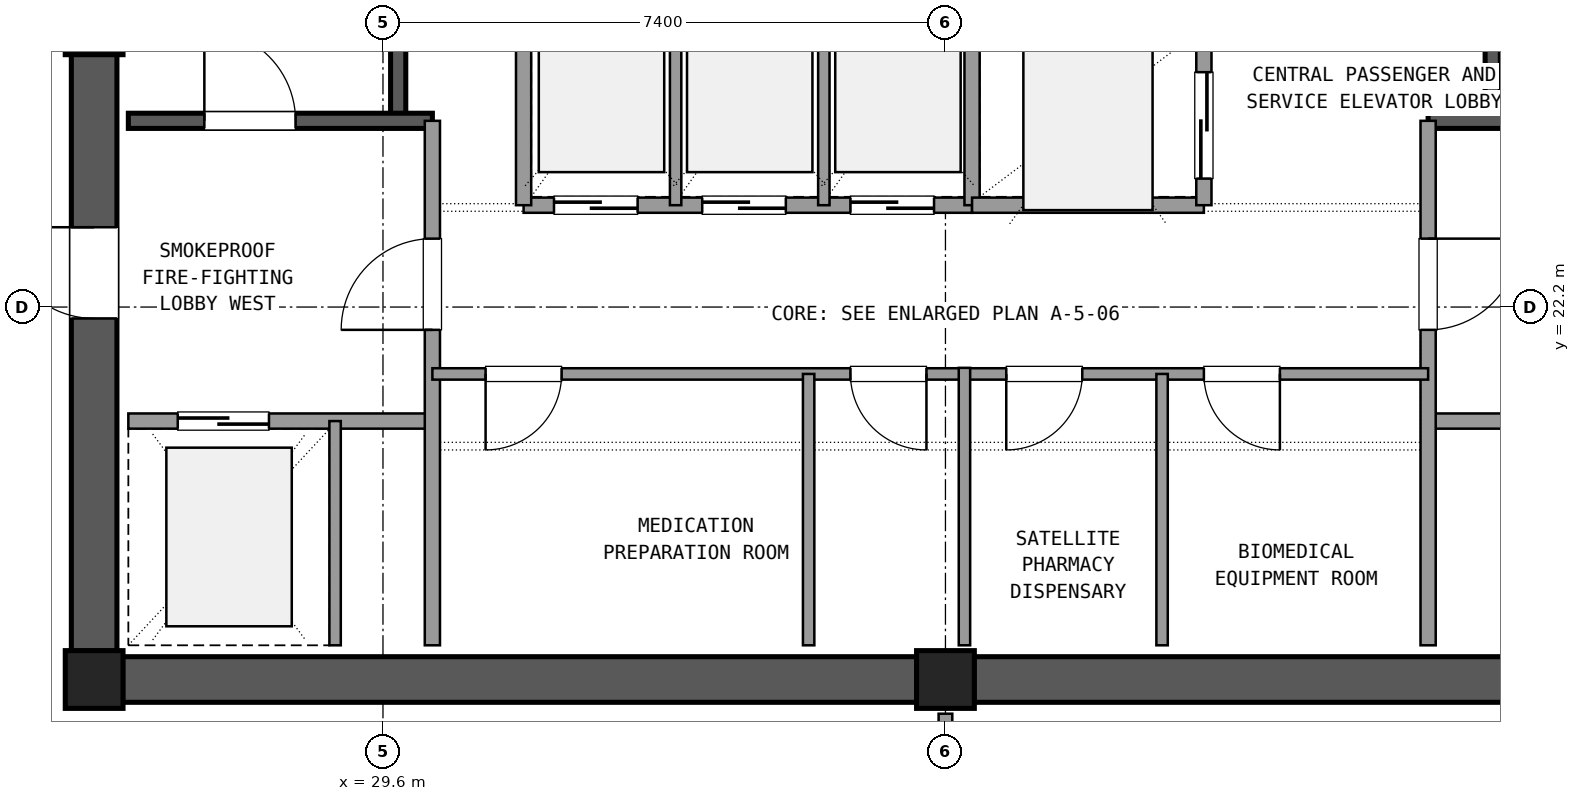
"""IFC4 building model, lengths in metres.
Left out: names, types, materials, properties, quantities, classifications, styles, units other than length and angle.
Written with IfcOpenShell. Run it as: python <this file> out.ifc"""

import sys

from ifc_helpers import new_model, si_unit, direction, frame, frame_2d, origin, origin_2d, place, context, subcontext, project, spatial, rectangle, extrude, element, fill, save


model = new_model("IFC4")
c1 = context("Model", 3, precision=1e-05, world=origin(), true_north=direction((0.0, 1.0)))
c2 = subcontext(c1, "Body", "Model", "MODEL_VIEW")
j1 = project(units=[si_unit("LENGTHUNIT", "METRE"), si_unit("PLANEANGLEUNIT", "RADIAN")], contexts=[c1])
p1 = place(None, origin())
s1 = spatial("IfcSite", under=j1, at=p1, CompositionType="ELEMENT")
p2 = place(p1, origin())
s2 = spatial("IfcBuilding", under=s1, at=p2, CompositionType="ELEMENT")
p3 = place(p2, frame((0.0, 0.0, 260.82)))
s3 = spatial("IfcBuildingStorey", under=s2, at=p3, CompositionType="ELEMENT", Elevation=260.82)
for number, where, z_axis, x_axis in (
    (1, (25.8, 17.3, 0.0), (0.0, 0.0, 1.0), (1.0, 0.0, 0.0)),
    (2, (37.0, 17.3, 0.0), (0.0, 0.0, 1.0), (1.0, 0.0, 0.0)),
    (3, (25.8, 25.9, 0.0), (0.0, 0.0, 1.0), (1.0, 0.0, 0.0)),
):
    element("IfcColumn", number, at=place(p3, frame(where, z_axis=z_axis, x_axis=x_axis)), inside=s3, PredefinedType="COLUMN", context=c2, shape_type="SweptSolid", body=[
        extrude(rectangle(XDim=0.76, YDim=0.76, at=origin_2d()), origin(), (0.0, 0.0, 1.0), 3.6),
    ])
for number, where, z_axis, x_axis in (
    (4, (26.175, 17.3, 0.0), (0.0, 0.0, 1.0), (1.0, 0.0, 0.0)),
    (5, (37.375, 17.3, 0.0), (0.0, 0.0, 1.0), (1.0, 0.0, 0.0)),
):
    element("IfcWall", number, at=place(p3, frame(where, z_axis=z_axis, x_axis=x_axis)), inside=s3, PredefinedType="SHEAR", context=c2, shape_type="SweptSolid", body=[
        extrude(rectangle(XDim=10.45, YDim=0.6, at=frame_2d((5.225, 0.0))), origin(), (0.0, 0.0, 1.0), 3.32),
    ])
p4 = place(p3, frame((25.8, 25.525, 0.0), z_axis=(0.0, 0.0, 1.0), x_axis=(0.0, -1.0, 0.0)))
e6 = element("IfcWall", 6, at=p4, inside=s3, PredefinedType="SHEAR", context=c2, shape_type="SweptSolid", body=[
    extrude(rectangle(XDim=7.85, YDim=0.6, at=frame_2d((3.925, 0.0))), origin(), (0.0, 0.0, 1.0), 3.32),
])
p5 = place(p4, frame((2.275, 0.0, 0.0)))
e7 = element("IfcOpeningElement", 7, at=p5, cuts=e6, PredefinedType="OPENING", context=c2, shape_type="SweptSolid", body=[
    extrude(rectangle(XDim=1.2, YDim=2.15, at=frame_2d((0.6, 1.075))), frame((0.0, 0.31, 0.0), z_axis=(0.0, -1.0, 0.0), x_axis=(1.0, 0.0, 0.0)), (0.0, 0.0, 1.0), 0.62),
])
p6 = place(p3, frame((29.8, 24.65, 0.0), z_axis=(0.0, 0.0, 1.0), x_axis=(0.0, 1.0, 0.0)))
e8 = element("IfcWall", 8, at=p6, inside=s3, PredefinedType="SHEAR", context=c2, shape_type="SweptSolid", body=[
    extrude(rectangle(XDim=9.4, YDim=0.2, at=frame_2d((4.7, 0.0))), origin(), (0.0, 0.0, 1.0), 3.32),
])
p7 = place(p3, frame((26.25, 24.65, 0.0), z_axis=(0.0, 0.0, 1.0), x_axis=(1.0, 0.0, 0.0)))
e9 = element("IfcWall", 9, at=p7, inside=s3, PredefinedType="SHEAR", context=c2, shape_type="SweptSolid", body=[
    extrude(rectangle(XDim=4.0, YDim=0.2, at=frame_2d((2.0, 0.0))), origin(), (0.0, 0.0, 1.0), 3.32),
])
p8 = place(p7, frame((1.0, 0.0, 0.0)))
e10 = element("IfcOpeningElement", 10, at=p8, cuts=e9, PredefinedType="OPENING", context=c2, shape_type="SweptSolid", body=[
    extrude(rectangle(XDim=1.2, YDim=2.15, at=frame_2d((0.6, 1.075))), frame((0.0, 0.11, 0.0), z_axis=(0.0, -1.0, 0.0), x_axis=(1.0, 0.0, 0.0)), (0.0, 0.0, 1.0), 0.22),
])
p9 = place(p3, frame((44.2, 24.65, 0.0), z_axis=(0.0, 0.0, 1.0), x_axis=(0.0, 1.0, 0.0)))
e11 = element("IfcWall", 11, at=p9, inside=s3, PredefinedType="SHEAR", context=c2, shape_type="SweptSolid", body=[
    extrude(rectangle(XDim=9.4, YDim=0.2, at=frame_2d((4.7, 0.0))), origin(), (0.0, 0.0, 1.0), 3.32),
])
p10 = place(p3, frame((43.35, 24.65, 0.0), z_axis=(0.0, 0.0, 1.0), x_axis=(1.0, 0.0, 0.0)))
e12 = element("IfcWall", 12, at=p10, inside=s3, PredefinedType="SHEAR", context=c2, shape_type="SweptSolid", body=[
    extrude(rectangle(XDim=4.4, YDim=0.2, at=frame_2d((2.2, 0.0))), origin(), (0.0, 0.0, 1.0), 3.32),
])
p11 = place(p10, frame((2.0, 0.0, 0.0)))
e13 = element("IfcOpeningElement", 13, at=p11, cuts=e12, PredefinedType="OPENING", context=c2, shape_type="SweptSolid", body=[
    extrude(rectangle(XDim=1.2, YDim=2.15, at=frame_2d((0.6, 1.075))), frame((0.0, 0.11, 0.0), z_axis=(0.0, -1.0, 0.0), x_axis=(1.0, 0.0, 0.0)), (0.0, 0.0, 1.0), 0.22),
])
p12 = place(p3, frame((26.25, 20.7, 0.0), z_axis=(0.0, 0.0, 1.0), x_axis=(1.0, 0.0, 0.0)))
e14 = element("IfcWall", 14, at=p12, inside=s3, PredefinedType="SOLIDWALL", context=c2, shape_type="SweptSolid", body=[
    extrude(rectangle(XDim=4.0, YDim=0.2, at=frame_2d((2.0, 0.0))), origin(), (0.0, 0.0, 1.0), 2.61),
])
p13 = place(p12, frame((0.65, 0.0, 0.0)))
e15 = element("IfcOpeningElement", 15, at=p13, cuts=e14, PredefinedType="OPENING", context=c2, shape_type="SweptSolid", body=[
    extrude(rectangle(XDim=1.2, YDim=2.15, at=frame_2d((0.6, 1.075))), frame((0.0, 0.11, 0.0), z_axis=(0.0, -1.0, 0.0), x_axis=(1.0, 0.0, 0.0)), (0.0, 0.0, 1.0), 0.22),
])
p14 = place(p3, frame((30.25, 17.75, 0.0), z_axis=(0.0, 0.0, 1.0), x_axis=(0.0, 1.0, 0.0)))
e16 = element("IfcWall", 16, at=p14, inside=s3, PredefinedType="SOLIDWALL", context=c2, shape_type="SweptSolid", body=[
    extrude(rectangle(XDim=6.9, YDim=0.2, at=frame_2d((3.45, 0.0))), origin(), (0.0, 0.0, 1.0), 2.61),
])
p15 = place(p14, frame((4.15, 0.0, 0.0)))
e17 = element("IfcOpeningElement", 17, at=p15, cuts=e16, PredefinedType="OPENING", context=c2, shape_type="SweptSolid", body=[
    extrude(rectangle(XDim=1.2, YDim=2.15, at=frame_2d((0.6, 1.075))), frame((0.0, 0.11, 0.0), z_axis=(0.0, -1.0, 0.0), x_axis=(1.0, 0.0, 0.0)), (0.0, 0.0, 1.0), 0.22),
])
p16 = place(p3, frame((28.97, 17.75, 0.0), z_axis=(0.0, 0.0, 1.0), x_axis=(0.0, 1.0, 0.0)))
e18 = element("IfcWall", 18, at=p16, inside=s3, PredefinedType="PARTITIONING", context=c2, shape_type="SweptSolid", body=[
    extrude(rectangle(XDim=2.95, YDim=0.15, at=frame_2d((1.475, 0.0))), origin(), (0.0, 0.0, 1.0), 2.61),
])
p17 = place(p3, frame((43.35, 20.7, 0.0), z_axis=(0.0, 0.0, 1.0), x_axis=(1.0, 0.0, 0.0)))
e19 = element("IfcWall", 19, at=p17, inside=s3, PredefinedType="SOLIDWALL", context=c2, shape_type="SweptSolid", body=[
    extrude(rectangle(XDim=4.4, YDim=0.2, at=frame_2d((2.2, 0.0))), origin(), (0.0, 0.0, 1.0), 2.61),
])
p18 = place(p17, frame((2.35, 0.0, 0.0)))
e20 = element("IfcOpeningElement", 20, at=p18, cuts=e19, PredefinedType="OPENING", context=c2, shape_type="SweptSolid", body=[
    extrude(rectangle(XDim=1.2, YDim=2.15, at=frame_2d((0.6, 1.075))), frame((0.0, 0.11, 0.0), z_axis=(0.0, -1.0, 0.0), x_axis=(1.0, 0.0, 0.0)), (0.0, 0.0, 1.0), 0.22),
])
p19 = place(p3, frame((43.35, 17.75, 0.0), z_axis=(0.0, 0.0, 1.0), x_axis=(0.0, 1.0, 0.0)))
e21 = element("IfcWall", 21, at=p19, inside=s3, PredefinedType="SOLIDWALL", context=c2, shape_type="SweptSolid", body=[
    extrude(rectangle(XDim=6.9, YDim=0.2, at=frame_2d((3.45, 0.0))), origin(), (0.0, 0.0, 1.0), 2.61),
])
p20 = place(p19, frame((4.15, 0.0, 0.0)))
e22 = element("IfcOpeningElement", 22, at=p20, cuts=e21, PredefinedType="OPENING", context=c2, shape_type="SweptSolid", body=[
    extrude(rectangle(XDim=1.2, YDim=2.15, at=frame_2d((0.6, 1.075))), frame((0.0, 0.11, 0.0), z_axis=(0.0, -1.0, 0.0), x_axis=(1.0, 0.0, 0.0)), (0.0, 0.0, 1.0), 0.22),
])
p21 = place(p3, frame((30.25, 21.32, 0.0), z_axis=(0.0, 0.0, 1.0), x_axis=(1.0, 0.0, 0.0)))
e23 = element("IfcWall", 23, at=p21, inside=s3, PredefinedType="PARTITIONING", context=c2, shape_type="SweptSolid", body=[
    extrude(rectangle(XDim=7.0, YDim=0.15, at=frame_2d((3.5, 0.0))), origin(), (0.0, 0.0, 1.0), 2.61),
])
p22 = place(p21, frame((0.7, 0.0, 0.0)))
e24 = element("IfcOpeningElement", 24, at=p22, cuts=e23, PredefinedType="OPENING", context=c2, shape_type="SweptSolid", body=[
    extrude(rectangle(XDim=1.0, YDim=2.15, at=frame_2d((0.5, 1.075))), frame((0.0, 0.085, 0.0), z_axis=(0.0, -1.0, 0.0), x_axis=(1.0, 0.0, 0.0)), (0.0, 0.0, 1.0), 0.17),
])
p23 = place(p21, frame((5.5, 0.0, 0.0)))
e25 = element("IfcOpeningElement", 25, at=p23, cuts=e23, PredefinedType="OPENING", context=c2, shape_type="SweptSolid", body=[
    extrude(rectangle(XDim=1.0, YDim=2.15, at=frame_2d((0.5, 1.075))), frame((0.0, 0.085, 0.0), z_axis=(0.0, -1.0, 0.0), x_axis=(1.0, 0.0, 0.0)), (0.0, 0.0, 1.0), 0.17),
])
p24 = place(p3, frame((35.2, 17.75, 0.0), z_axis=(0.0, 0.0, 1.0), x_axis=(0.0, 1.0, 0.0)))
e26 = element("IfcWall", 26, at=p24, inside=s3, PredefinedType="PARTITIONING", context=c2, shape_type="SweptSolid", body=[
    extrude(rectangle(XDim=3.57, YDim=0.15, at=frame_2d((1.785, 0.0))), origin(), (0.0, 0.0, 1.0), 2.61),
])
p25 = place(p3, frame((37.25, 21.32, 0.0), z_axis=(0.0, 0.0, 1.0), x_axis=(1.0, 0.0, 0.0)))
e27 = element("IfcWall", 27, at=p25, inside=s3, PredefinedType="PARTITIONING", context=c2, shape_type="SweptSolid", body=[
    extrude(rectangle(XDim=6.1, YDim=0.15, at=frame_2d((3.05, 0.0))), origin(), (0.0, 0.0, 1.0), 2.61),
])
p26 = place(p25, frame((0.55, 0.0, 0.0)))
e28 = element("IfcOpeningElement", 28, at=p26, cuts=e27, PredefinedType="OPENING", context=c2, shape_type="SweptSolid", body=[
    extrude(rectangle(XDim=1.0, YDim=2.15, at=frame_2d((0.5, 1.075))), frame((0.0, 0.085, 0.0), z_axis=(0.0, -1.0, 0.0), x_axis=(1.0, 0.0, 0.0)), (0.0, 0.0, 1.0), 0.17),
])
p27 = place(p25, frame((3.15, 0.0, 0.0)))
e29 = element("IfcOpeningElement", 29, at=p27, cuts=e27, PredefinedType="OPENING", context=c2, shape_type="SweptSolid", body=[
    extrude(rectangle(XDim=1.0, YDim=2.15, at=frame_2d((0.5, 1.075))), frame((0.0, 0.085, 0.0), z_axis=(0.0, -1.0, 0.0), x_axis=(1.0, 0.0, 0.0)), (0.0, 0.0, 1.0), 0.17),
])
p28 = place(p3, frame((39.85, 17.75, 0.0), z_axis=(0.0, 0.0, 1.0), x_axis=(0.0, 1.0, 0.0)))
e30 = element("IfcWall", 30, at=p28, inside=s3, PredefinedType="PARTITIONING", context=c2, shape_type="SweptSolid", body=[
    extrude(rectangle(XDim=3.57, YDim=0.15, at=frame_2d((1.785, 0.0))), origin(), (0.0, 0.0, 1.0), 2.61),
])
p29 = place(p3, frame((37.25, 17.75, 0.0), z_axis=(0.0, 0.0, 1.0), x_axis=(0.0, 1.0, 0.0)))
e31 = element("IfcWall", 31, at=p29, inside=s3, PredefinedType="PARTITIONING", context=c2, shape_type="SweptSolid", body=[
    extrude(rectangle(XDim=3.65, YDim=0.15, at=frame_2d((1.825, 0.0))), origin(), (0.0, 0.0, 1.0), 2.61),
])
p30 = place(p3, frame((31.45, 23.54, 0.0), z_axis=(0.0, 0.0, 1.0), x_axis=(1.0, 0.0, 0.0)))
e32 = element("IfcWall", 32, at=p30, inside=s3, PredefinedType="SOLIDWALL", context=c2, shape_type="SweptSolid", body=[
    extrude(rectangle(XDim=5.9, YDim=0.2, at=frame_2d((2.95, 0.0))), origin(), (0.0, 0.0, 1.0), 2.61),
])
p31 = place(p30, frame((0.4, 0.0, 0.0)))
e33 = element("IfcOpeningElement", 33, at=p31, cuts=e32, PredefinedType="OPENING", context=c2, shape_type="SweptSolid", body=[
    extrude(rectangle(XDim=1.1, YDim=2.15, at=frame_2d((0.55, 1.075))), frame((0.0, 0.11, 0.0), z_axis=(0.0, -1.0, 0.0), x_axis=(1.0, 0.0, 0.0)), (0.0, 0.0, 1.0), 0.22),
])
p32 = place(p30, frame((2.35, 0.0, 0.0)))
e34 = element("IfcOpeningElement", 34, at=p32, cuts=e32, PredefinedType="OPENING", context=c2, shape_type="SweptSolid", body=[
    extrude(rectangle(XDim=1.1, YDim=2.15, at=frame_2d((0.55, 1.075))), frame((0.0, 0.11, 0.0), z_axis=(0.0, -1.0, 0.0), x_axis=(1.0, 0.0, 0.0)), (0.0, 0.0, 1.0), 0.22),
])
p33 = place(p30, frame((4.3, 0.0, 0.0)))
e35 = element("IfcOpeningElement", 35, at=p33, cuts=e32, PredefinedType="OPENING", context=c2, shape_type="SweptSolid", body=[
    extrude(rectangle(XDim=1.1, YDim=2.15, at=frame_2d((0.55, 1.075))), frame((0.0, 0.11, 0.0), z_axis=(0.0, -1.0, 0.0), x_axis=(1.0, 0.0, 0.0)), (0.0, 0.0, 1.0), 0.22),
])
p34 = place(p3, frame((31.45, 23.54, 0.0), z_axis=(0.0, 0.0, 1.0), x_axis=(0.0, 1.0, 0.0)))
e36 = element("IfcWall", 36, at=p34, inside=s3, PredefinedType="SOLIDWALL", context=c2, shape_type="SweptSolid", body=[
    extrude(rectangle(XDim=2.81, YDim=0.2, at=frame_2d((1.405, 0.0))), origin(), (0.0, 0.0, 1.0), 2.61),
])
for number, where, z_axis, x_axis in (
    (37, (33.45, 23.54, 0.0), (0.0, 0.0, 1.0), (0.0, 1.0, 0.0)),
    (38, (35.4, 23.54, 0.0), (0.0, 0.0, 1.0), (0.0, 1.0, 0.0)),
):
    element("IfcWall", number, at=place(p3, frame(where, z_axis=z_axis, x_axis=x_axis)), inside=s3, PredefinedType="PARTITIONING", context=c2, shape_type="SweptSolid", body=[
        extrude(rectangle(XDim=2.81, YDim=0.15, at=frame_2d((1.405, 0.0))), origin(), (0.0, 0.0, 1.0), 2.61),
    ])
p35 = place(p3, frame((37.35, 23.54, 0.0), z_axis=(0.0, 0.0, 1.0), x_axis=(0.0, 1.0, 0.0)))
e39 = element("IfcWall", 39, at=p35, inside=s3, PredefinedType="SOLIDWALL", context=c2, shape_type="SweptSolid", body=[
    extrude(rectangle(XDim=6.82, YDim=0.2, at=frame_2d((3.41, 0.0))), origin(), (0.0, 0.0, 1.0), 2.61),
])
p36 = place(p3, frame((37.35, 23.54, 0.0), z_axis=(0.0, 0.0, 1.0), x_axis=(1.0, 0.0, 0.0)))
e40 = element("IfcWall", 40, at=p36, inside=s3, PredefinedType="SOLIDWALL", context=c2, shape_type="SweptSolid", body=[
    extrude(rectangle(XDim=3.05, YDim=0.2, at=frame_2d((1.525, 0.0))), origin(), (0.0, 0.0, 1.0), 2.61),
])
p37 = place(p3, frame((40.4, 23.54, 0.0), z_axis=(0.0, 0.0, 1.0), x_axis=(0.0, 1.0, 0.0)))
e41 = element("IfcWall", 41, at=p37, inside=s3, PredefinedType="SOLIDWALL", context=c2, shape_type="SweptSolid", body=[
    extrude(rectangle(XDim=6.82, YDim=0.2, at=frame_2d((3.41, 0.0))), origin(), (0.0, 0.0, 1.0), 2.61),
])
p38 = place(p37, frame((0.35, 0.0, 0.0)))
e42 = element("IfcOpeningElement", 42, at=p38, cuts=e41, PredefinedType="OPENING", context=c2, shape_type="SweptSolid", body=[
    extrude(rectangle(XDim=1.4, YDim=2.2, at=frame_2d((0.7, 1.1))), frame((0.0, 0.11, 0.0), z_axis=(0.0, -1.0, 0.0), x_axis=(1.0, 0.0, 0.0)), (0.0, 0.0, 1.0), 0.22),
])
p39 = place(p37, frame((2.65, 0.0, 0.0)))
e43 = element("IfcOpeningElement", 43, at=p39, cuts=e41, PredefinedType="OPENING", context=c2, shape_type="SweptSolid", body=[
    extrude(rectangle(XDim=1.4, YDim=2.2, at=frame_2d((0.7, 1.1))), frame((0.0, 0.11, 0.0), z_axis=(0.0, -1.0, 0.0), x_axis=(1.0, 0.0, 0.0)), (0.0, 0.0, 1.0), 0.22),
])
p40 = place(p37, frame((4.85, 0.0, 0.0)))
e44 = element("IfcOpeningElement", 44, at=p40, cuts=e41, PredefinedType="OPENING", context=c2, shape_type="SweptSolid", body=[
    extrude(rectangle(XDim=1.4, YDim=2.2, at=frame_2d((0.7, 1.1))), frame((0.0, 0.11, 0.0), z_axis=(0.0, -1.0, 0.0), x_axis=(1.0, 0.0, 0.0)), (0.0, 0.0, 1.0), 0.22),
])
p41 = place(p3, frame((37.0, 14.15, 0.0), z_axis=(0.0, 0.0, 1.0), x_axis=(0.0, 1.0, 0.0)))
e45 = element("IfcWall", 45, at=p41, inside=s3, PredefinedType="PARTITIONING", context=c2, shape_type="SweptSolid", body=[
    extrude(rectangle(XDim=2.7, YDim=0.18, at=frame_2d((1.35, 0.0))), origin(), (0.0, 0.0, 1.0), 2.61),
])
p42 = place(p41, frame((0.35, 0.0, 0.0)))
e46 = element("IfcOpeningElement", 46, at=p42, cuts=e45, PredefinedType="OPENING", context=c2, shape_type="SweptSolid", body=[
    extrude(rectangle(XDim=2.0, YDim=2.2, at=frame_2d((1.0, 1.1))), frame((0.0, 0.1, 0.0), z_axis=(0.0, -1.0, 0.0), x_axis=(1.0, 0.0, 0.0)), (0.0, 0.0, 1.0), 0.2),
])
p43 = place(p8, origin())
e47 = element("IfcDoor", 47, at=p43, inside=s3, OperationType="SINGLE_SWING_LEFT", PredefinedType="DOOR", context=c2, shape_type="SweptSolid", body=[
    extrude(rectangle(XDim=1.2, YDim=2.15, at=frame_2d((0.6, 1.075))), frame((0.0, 0.025, 0.0), z_axis=(0.0, -1.0, 0.0), x_axis=(1.0, 0.0, 0.0)), (0.0, 0.0, 1.0), 0.05),
])
fill(e10, e47)
p44 = place(p13, origin())
e48 = element("IfcDoor", 48, at=p44, inside=s3, OperationType="SLIDING_TO_LEFT", PredefinedType="DOOR", context=c2, shape_type="SweptSolid", body=[
    extrude(rectangle(XDim=1.2, YDim=2.15, at=frame_2d((0.6, 1.075))), frame((0.0, 0.025, 0.0), z_axis=(0.0, -1.0, 0.0), x_axis=(1.0, 0.0, 0.0)), (0.0, 0.0, 1.0), 0.05),
])
fill(e15, e48)
p45 = place(p15, origin())
e49 = element("IfcDoor", 49, at=p45, inside=s3, OperationType="SINGLE_SWING_LEFT", PredefinedType="DOOR", context=c2, shape_type="SweptSolid", body=[
    extrude(rectangle(XDim=1.2, YDim=2.15, at=frame_2d((0.6, 1.075))), frame((0.0, 0.025, 0.0), z_axis=(0.0, -1.0, 0.0), x_axis=(1.0, 0.0, 0.0)), (0.0, 0.0, 1.0), 0.05),
])
fill(e17, e49)
p46 = place(p20, frame((1.2, 0.0, 0.0), z_axis=(0.0, 0.0, 1.0), x_axis=(-1.0, 0.0, 0.0)))
e50 = element("IfcDoor", 50, at=p46, inside=s3, OperationType="SINGLE_SWING_RIGHT", PredefinedType="DOOR", context=c2, shape_type="SweptSolid", body=[
    extrude(rectangle(XDim=1.2, YDim=2.15, at=frame_2d((0.6, 1.075))), frame((0.0, 0.025, 0.0), z_axis=(0.0, -1.0, 0.0), x_axis=(1.0, 0.0, 0.0)), (0.0, 0.0, 1.0), 0.05),
])
fill(e22, e50)
p47 = place(p5, frame((1.2, 0.0, 0.0), z_axis=(0.0, 0.0, 1.0), x_axis=(-1.0, 0.0, 0.0)))
e51 = element("IfcDoor", 51, at=p47, inside=s3, OperationType="SINGLE_SWING_LEFT", PredefinedType="DOOR", context=c2, shape_type="SweptSolid", body=[
    extrude(rectangle(XDim=1.2, YDim=2.15, at=frame_2d((0.6, 1.075))), frame((0.0, 0.025, 0.0), z_axis=(0.0, -1.0, 0.0), x_axis=(1.0, 0.0, 0.0)), (0.0, 0.0, 1.0), 0.05),
])
fill(e7, e51)
p48 = place(p22, frame((1.0, 0.0, 0.0), z_axis=(0.0, 0.0, 1.0), x_axis=(-1.0, 0.0, 0.0)))
e52 = element("IfcDoor", 52, at=p48, inside=s3, OperationType="SINGLE_SWING_LEFT", PredefinedType="DOOR", context=c2, shape_type="SweptSolid", body=[
    extrude(rectangle(XDim=1.0, YDim=2.15, at=frame_2d((0.5, 1.075))), frame((0.0, 0.025, 0.0), z_axis=(0.0, -1.0, 0.0), x_axis=(1.0, 0.0, 0.0)), (0.0, 0.0, 1.0), 0.05),
])
fill(e24, e52)
p49 = place(p23, frame((1.0, 0.0, 0.0), z_axis=(0.0, 0.0, 1.0), x_axis=(-1.0, 0.0, 0.0)))
e53 = element("IfcDoor", 53, at=p49, inside=s3, OperationType="SINGLE_SWING_RIGHT", PredefinedType="DOOR", context=c2, shape_type="SweptSolid", body=[
    extrude(rectangle(XDim=1.0, YDim=2.15, at=frame_2d((0.5, 1.075))), frame((0.0, 0.025, 0.0), z_axis=(0.0, -1.0, 0.0), x_axis=(1.0, 0.0, 0.0)), (0.0, 0.0, 1.0), 0.05),
])
fill(e25, e53)
p50 = place(p26, frame((1.0, 0.0, 0.0), z_axis=(0.0, 0.0, 1.0), x_axis=(-1.0, 0.0, 0.0)))
e54 = element("IfcDoor", 54, at=p50, inside=s3, OperationType="SINGLE_SWING_LEFT", PredefinedType="DOOR", context=c2, shape_type="SweptSolid", body=[
    extrude(rectangle(XDim=1.0, YDim=2.15, at=frame_2d((0.5, 1.075))), frame((0.0, 0.025, 0.0), z_axis=(0.0, -1.0, 0.0), x_axis=(1.0, 0.0, 0.0)), (0.0, 0.0, 1.0), 0.05),
])
fill(e28, e54)
p51 = place(p27, frame((1.0, 0.0, 0.0), z_axis=(0.0, 0.0, 1.0), x_axis=(-1.0, 0.0, 0.0)))
e55 = element("IfcDoor", 55, at=p51, inside=s3, OperationType="SINGLE_SWING_RIGHT", PredefinedType="DOOR", context=c2, shape_type="SweptSolid", body=[
    extrude(rectangle(XDim=1.0, YDim=2.15, at=frame_2d((0.5, 1.075))), frame((0.0, 0.025, 0.0), z_axis=(0.0, -1.0, 0.0), x_axis=(1.0, 0.0, 0.0)), (0.0, 0.0, 1.0), 0.05),
])
fill(e29, e55)
p52 = place(p31, origin())
e56 = element("IfcDoor", 56, at=p52, inside=s3, OperationType="SLIDING_TO_RIGHT", PredefinedType="DOOR", context=c2, shape_type="SweptSolid", body=[
    extrude(rectangle(XDim=1.1, YDim=2.15, at=frame_2d((0.55, 1.075))), frame((0.0, 0.025, 0.0), z_axis=(0.0, -1.0, 0.0), x_axis=(1.0, 0.0, 0.0)), (0.0, 0.0, 1.0), 0.05),
])
fill(e33, e56)
p53 = place(p32, origin())
e57 = element("IfcDoor", 57, at=p53, inside=s3, OperationType="SLIDING_TO_RIGHT", PredefinedType="DOOR", context=c2, shape_type="SweptSolid", body=[
    extrude(rectangle(XDim=1.1, YDim=2.15, at=frame_2d((0.55, 1.075))), frame((0.0, 0.025, 0.0), z_axis=(0.0, -1.0, 0.0), x_axis=(1.0, 0.0, 0.0)), (0.0, 0.0, 1.0), 0.05),
])
fill(e34, e57)
p54 = place(p33, origin())
e58 = element("IfcDoor", 58, at=p54, inside=s3, OperationType="SLIDING_TO_RIGHT", PredefinedType="DOOR", context=c2, shape_type="SweptSolid", body=[
    extrude(rectangle(XDim=1.1, YDim=2.15, at=frame_2d((0.55, 1.075))), frame((0.0, 0.025, 0.0), z_axis=(0.0, -1.0, 0.0), x_axis=(1.0, 0.0, 0.0)), (0.0, 0.0, 1.0), 0.05),
])
fill(e35, e58)
p55 = place(p38, origin())
e59 = element("IfcDoor", 59, at=p55, inside=s3, OperationType="SLIDING_TO_LEFT", PredefinedType="DOOR", context=c2, shape_type="SweptSolid", body=[
    extrude(rectangle(XDim=1.4, YDim=2.2, at=frame_2d((0.7, 1.1))), frame((0.0, 0.025, 0.0), z_axis=(0.0, -1.0, 0.0), x_axis=(1.0, 0.0, 0.0)), (0.0, 0.0, 1.0), 0.05),
])
fill(e42, e59)
save(model, sys.argv[1])
